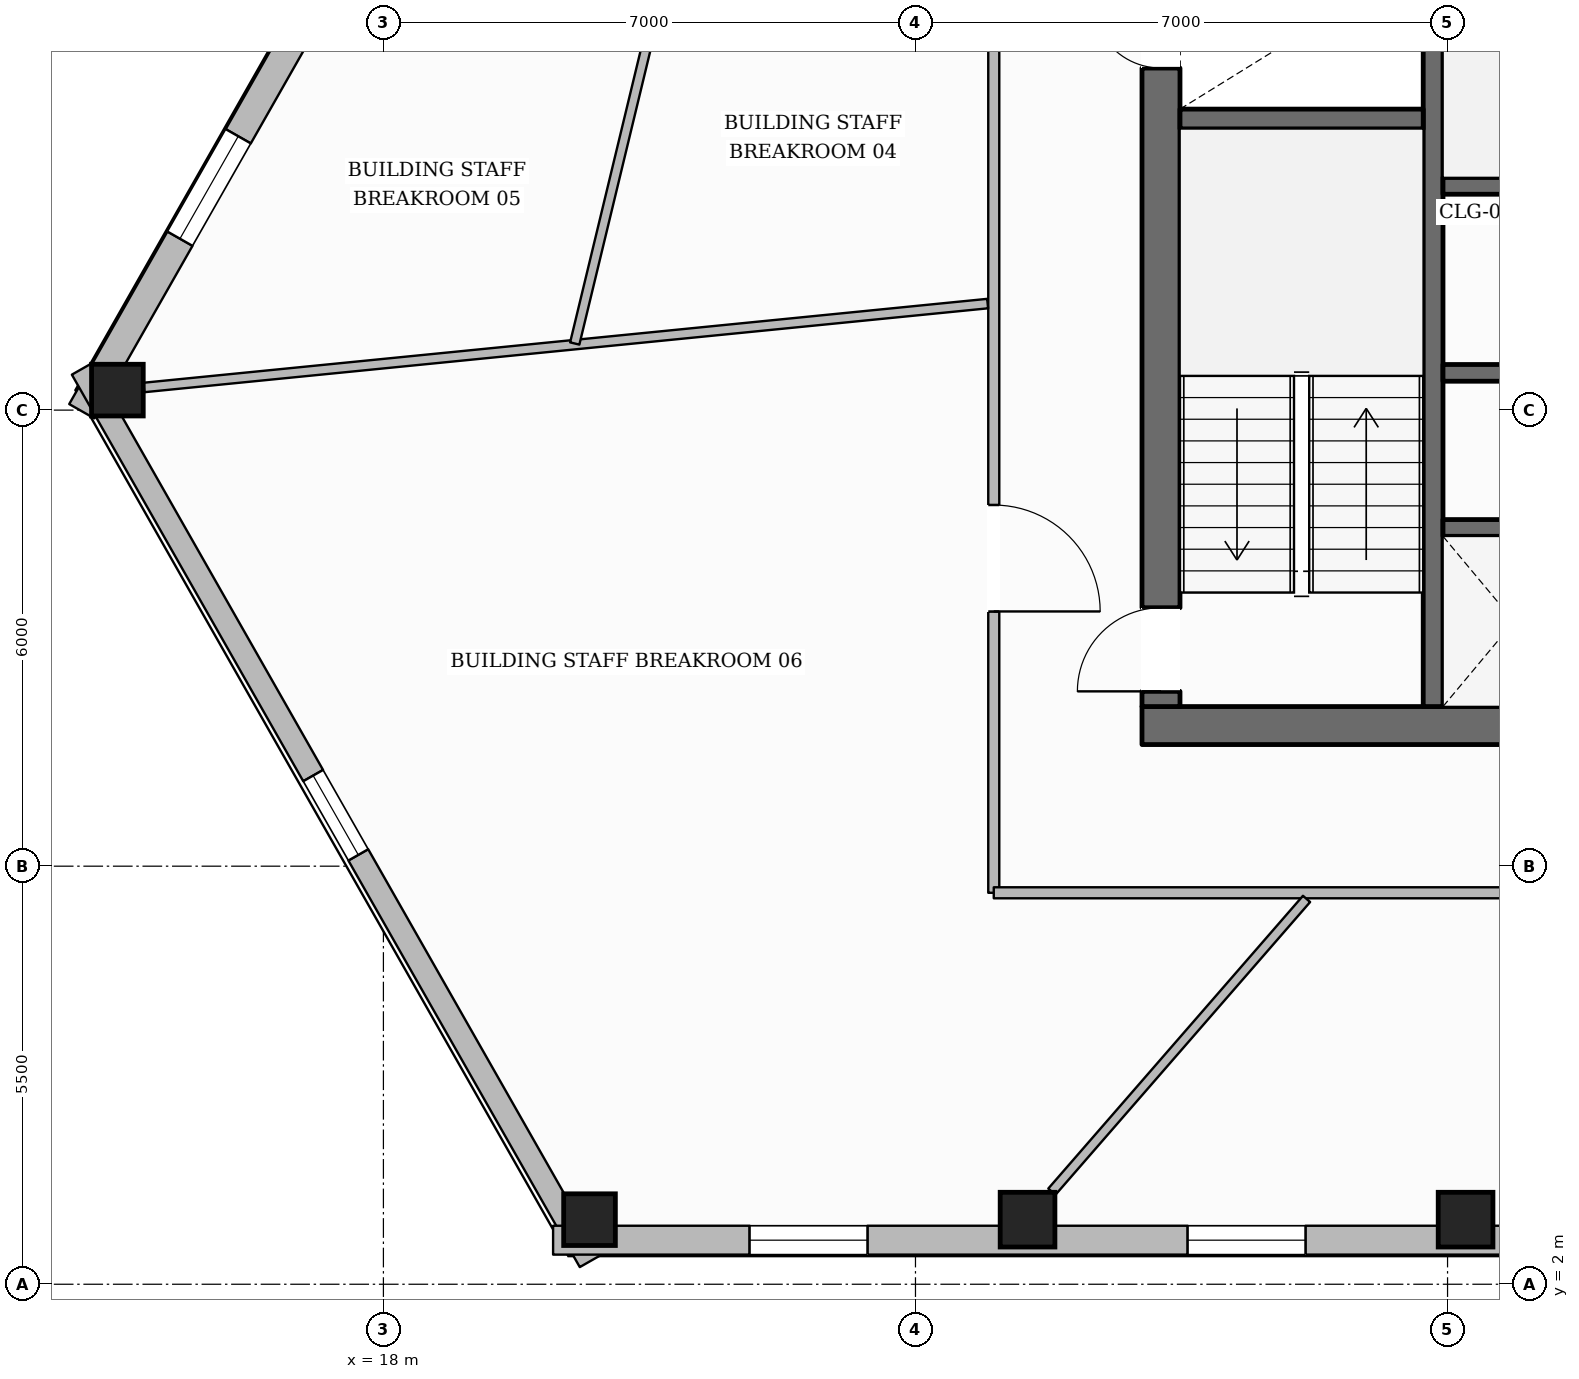
"""IFC4 building model, lengths in metres.
Left out: names, types, materials, properties, quantities, classifications, styles, units other than length and angle.
Written with IfcOpenShell. Run it as: python <this file> out.ifc"""

import sys

from ifc_helpers import new_model, si_unit, direction, frame, frame_2d, origin, origin_2d, place, context, subcontext, project, spatial, rectangle, hollow_rectangle, extrude, element, fill, save


model = new_model("IFC4")
c1 = context("Model", 3, precision=1e-05, world=origin(), true_north=direction((0.0, 1.0)))
c2 = subcontext(c1, "Body", "Model", "MODEL_VIEW")
j1 = project(units=[si_unit("LENGTHUNIT", "METRE"), si_unit("PLANEANGLEUNIT", "RADIAN")], contexts=[c1])
p1 = place(None, origin())
s1 = spatial("IfcSite", under=j1, at=p1, CompositionType="ELEMENT")
p2 = place(p1, origin())
s2 = spatial("IfcBuilding", under=s1, at=p2, CompositionType="ELEMENT")
p3 = place(p2, frame((0.0, 0.0, 93.2)))
s3 = spatial("IfcBuildingStorey", under=s2, at=p3, CompositionType="ELEMENT", Elevation=93.2)
p4 = place(p3, frame((27.98, 9.35, 0.0), z_axis=(0.0, 0.0, 1.0), x_axis=(1.0, 0.0, 0.0)))
e1 = element("IfcWall", 1, at=p4, inside=s3, PredefinedType="SOLIDWALL", context=c2, shape_type="SweptSolid", body=[
    extrude(rectangle(XDim=20.04, YDim=0.5, at=frame_2d((10.02, 0.0))), origin(), (0.0, 0.0, 1.0), 3.6),
])
p5 = place(p4, frame((10.52, 0.0, 0.0)))
e2 = element("IfcOpeningElement", 2, at=p5, cuts=e1, PredefinedType="OPENING", context=c2, shape_type="SweptSolid", body=[
    extrude(rectangle(XDim=1.4, YDim=2.2, at=frame_2d((0.7, 1.1))), frame((0.0, 0.26, 0.0), z_axis=(0.0, -1.0, 0.0), x_axis=(1.0, 0.0, 0.0)), (0.0, 0.0, 1.0), 0.52),
])
p6 = place(p3, frame((28.23, 9.6, 0.0), z_axis=(0.0, 0.0, 1.0), x_axis=(0.0, 1.0, 0.0)))
e3 = element("IfcWall", 3, at=p6, inside=s3, PredefinedType="SOLIDWALL", context=c2, shape_type="SweptSolid", body=[
    extrude(rectangle(XDim=13.0, YDim=0.5, at=frame_2d((6.5, 0.0))), origin(), (0.0, 0.0, 1.0), 3.6),
])
p7 = place(p6, frame((0.2, 0.0, 0.0)))
e4 = element("IfcOpeningElement", 4, at=p7, cuts=e3, PredefinedType="OPENING", context=c2, shape_type="SweptSolid", body=[
    extrude(rectangle(XDim=1.1, YDim=2.15, at=frame_2d((0.55, 1.075))), frame((0.0, 0.26, 0.0), z_axis=(0.0, -1.0, 0.0), x_axis=(1.0, 0.0, 0.0)), (0.0, 0.0, 1.0), 0.52),
])
p8 = place(p6, frame((8.4, 0.0, 0.0)))
e5 = element("IfcOpeningElement", 5, at=p8, cuts=e3, PredefinedType="OPENING", context=c2, shape_type="SweptSolid", body=[
    extrude(rectangle(XDim=0.9, YDim=2.1, at=frame_2d((0.45, 1.05))), frame((0.0, 0.26, 0.0), z_axis=(0.0, -1.0, 0.0), x_axis=(1.0, 0.0, 0.0)), (0.0, 0.0, 1.0), 0.52),
])
p9 = place(p3, frame((31.81, 9.6, 0.0), z_axis=(0.0, 0.0, 1.0), x_axis=(0.0, 1.0, 0.0)))
e6 = element("IfcWall", 6, at=p9, inside=s3, PredefinedType="SHEAR", context=c2, shape_type="SweptSolid", body=[
    extrude(rectangle(XDim=13.0, YDim=0.26, at=frame_2d((6.5, 0.0))), origin(), (0.0, 0.0, 1.0), 3.6),
])
p10 = place(p9, frame((10.925, 0.0, 0.0)))
e7 = element("IfcOpeningElement", 7, at=p10, cuts=e6, PredefinedType="OPENING", context=c2, shape_type="SweptSolid", body=[
    extrude(rectangle(XDim=1.25, YDim=2.25, at=frame_2d((0.625, 1.125))), frame((0.0, 0.14, 0.0), z_axis=(0.0, -1.0, 0.0), x_axis=(1.0, 0.0, 0.0)), (0.0, 0.0, 1.0), 0.28),
])
p11 = place(p3, frame((28.48, 17.33, 0.0), z_axis=(0.0, 0.0, 1.0), x_axis=(1.0, 0.0, 0.0)))
e8 = element("IfcWall", 8, at=p11, inside=s3, PredefinedType="SHEAR", context=c2, shape_type="SweptSolid", body=[
    extrude(rectangle(XDim=3.2, YDim=0.26, at=frame_2d((1.6, 0.0))), origin(), (0.0, 0.0, 1.0), 3.6),
])
p12 = place(p3, frame((31.94, 16.45, 0.0), z_axis=(0.0, 0.0, 1.0), x_axis=(1.0, 0.0, 0.0)))
e9 = element("IfcWall", 9, at=p12, inside=s3, PredefinedType="SOLIDWALL", context=c2, shape_type="SweptSolid", body=[
    extrude(rectangle(XDim=12.12, YDim=0.22, at=frame_2d((6.06, 0.0))), origin(), (0.0, 0.0, 1.0), 3.6),
])
p13 = place(p3, frame((31.94, 13.99, 0.0), z_axis=(0.0, 0.0, 1.0), x_axis=(1.0, 0.0, 0.0)))
e10 = element("IfcWall", 10, at=p13, inside=s3, PredefinedType="SOLIDWALL", context=c2, shape_type="SweptSolid", body=[
    extrude(rectangle(XDim=12.12, YDim=0.22, at=frame_2d((6.06, 0.0))), origin(), (0.0, 0.0, 1.0), 3.6),
])
p14 = place(p13, frame((1.21, 0.0, 0.0)))
e11 = element("IfcOpeningElement", 11, at=p14, cuts=e10, PredefinedType="OPENING", context=c2, shape_type="SweptSolid", body=[
    extrude(rectangle(XDim=0.9, YDim=2.1, at=frame_2d((0.45, 1.05))), frame((0.0, 0.12, 0.0), z_axis=(0.0, -1.0, 0.0), x_axis=(1.0, 0.0, 0.0)), (0.0, 0.0, 1.0), 0.24),
])
p15 = place(p13, frame((4.31, 0.0, 0.0)))
e12 = element("IfcOpeningElement", 12, at=p15, cuts=e10, PredefinedType="OPENING", context=c2, shape_type="SweptSolid", body=[
    extrude(rectangle(XDim=0.9, YDim=2.1, at=frame_2d((0.45, 1.05))), frame((0.0, 0.12, 0.0), z_axis=(0.0, -1.0, 0.0), x_axis=(1.0, 0.0, 0.0)), (0.0, 0.0, 1.0), 0.24),
])
p16 = place(p13, frame((6.535, 0.0, 0.0)))
e13 = element("IfcOpeningElement", 13, at=p16, cuts=e10, PredefinedType="OPENING", context=c2, shape_type="SweptSolid", body=[
    extrude(rectangle(XDim=1.1, YDim=2.2, at=frame_2d((0.55, 1.1))), frame((0.0, 0.12, 0.0), z_axis=(0.0, -1.0, 0.0), x_axis=(1.0, 0.0, 0.0)), (0.0, 0.0, 1.0), 0.24),
])
p17 = place(p13, frame((8.585, 0.0, 0.0)))
e14 = element("IfcOpeningElement", 14, at=p17, cuts=e10, PredefinedType="OPENING", context=c2, shape_type="SweptSolid", body=[
    extrude(rectangle(XDim=1.1, YDim=2.2, at=frame_2d((0.55, 1.1))), frame((0.0, 0.12, 0.0), z_axis=(0.0, -1.0, 0.0), x_axis=(1.0, 0.0, 0.0)), (0.0, 0.0, 1.0), 0.24),
])
p18 = place(p13, frame((10.635, 0.0, 0.0)))
e15 = element("IfcOpeningElement", 15, at=p18, cuts=e10, PredefinedType="OPENING", context=c2, shape_type="SweptSolid", body=[
    extrude(rectangle(XDim=1.1, YDim=2.2, at=frame_2d((0.55, 1.1))), frame((0.0, 0.12, 0.0), z_axis=(0.0, -1.0, 0.0), x_axis=(1.0, 0.0, 0.0)), (0.0, 0.0, 1.0), 0.24),
])
p19 = place(p3, frame((31.94, 11.95, 0.0), z_axis=(0.0, 0.0, 1.0), x_axis=(1.0, 0.0, 0.0)))
e16 = element("IfcWall", 16, at=p19, inside=s3, PredefinedType="SOLIDWALL", context=c2, shape_type="SweptSolid", body=[
    extrude(rectangle(XDim=6.19, YDim=0.22, at=frame_2d((3.095, 0.0))), origin(), (0.0, 0.0, 1.0), 3.6),
])
for number, where, z_axis, x_axis in (
    (17, (14.5, 13.763, 0.0), (0.0, 0.0, 1.0), (1.0, 0.0, 0.0)),
    (18, (20.712, 2.85, 0.0), (0.0, 0.0, 1.0), (1.0, 0.0, 0.0)),
):
    element("IfcColumn", number, at=place(p3, frame(where, z_axis=z_axis, x_axis=x_axis)), inside=s3, PredefinedType="COLUMN", context=c2, shape_type="SweptSolid", body=[
        extrude(hollow_rectangle(XDim=0.68, YDim=0.68, WallThickness=0.03, at=origin_2d()), origin(), (0.0, 0.0, 1.0), 3.6),
    ])
for number, where, z_axis, x_axis in (
    (19, (26.474, 2.85, 0.0), (0.0, 0.0, 1.0), (1.0, 0.0, 0.0)),
    (20, (32.237, 2.85, 0.0), (0.0, 0.0, 1.0), (1.0, 0.0, 0.0)),
):
    element("IfcColumn", number, at=place(p3, frame(where, z_axis=z_axis, x_axis=x_axis)), inside=s3, PredefinedType="COLUMN", context=c2, shape_type="SweptSolid", body=[
        extrude(hollow_rectangle(XDim=0.72, YDim=0.72, WallThickness=0.032, at=origin_2d()), origin(), (0.0, 0.0, 1.0), 3.6),
    ])
p20 = place(p3, frame((14.031, 13.485, 0.0), z_axis=(0.0, 0.0, 1.0), x_axis=(0.494642620698, 0.869096472084, 0.0)))
e21 = element("IfcWall", 21, at=p20, inside=s3, PredefinedType="STANDARD", context=c2, shape_type="SweptSolid", body=[
    extrude(rectangle(XDim=35.916, YDim=0.38, at=frame_2d((17.958, 0.0))), origin(), (0.0, 0.0, 1.0), 3.059),
])
p21 = place(p20, frame((31.748, 0.0, 0.65)))
e22 = element("IfcOpeningElement", 22, at=p21, cuts=e21, PredefinedType="OPENING", context=c2, shape_type="SweptSolid", body=[
    extrude(rectangle(XDim=1.55, YDim=1.75, at=frame_2d((0.775, 0.875))), frame((0.0, 0.2, 0.0), z_axis=(0.0, -1.0, 0.0), x_axis=(1.0, 0.0, 0.0)), (0.0, 0.0, 1.0), 0.4),
])
p22 = place(p20, frame((25.921, 0.0, 0.65)))
e23 = element("IfcOpeningElement", 23, at=p22, cuts=e21, PredefinedType="OPENING", context=c2, shape_type="SweptSolid", body=[
    extrude(rectangle(XDim=1.55, YDim=1.75, at=frame_2d((0.775, 0.875))), frame((0.0, 0.2, 0.0), z_axis=(0.0, -1.0, 0.0), x_axis=(1.0, 0.0, 0.0)), (0.0, 0.0, 1.0), 0.4),
])
p23 = place(p20, frame((8.439, 0.0, 0.65)))
e24 = element("IfcOpeningElement", 24, at=p23, cuts=e21, PredefinedType="OPENING", context=c2, shape_type="SweptSolid", body=[
    extrude(rectangle(XDim=1.55, YDim=1.75, at=frame_2d((0.775, 0.875))), frame((0.0, 0.2, 0.0), z_axis=(0.0, -1.0, 0.0), x_axis=(1.0, 0.0, 0.0)), (0.0, 0.0, 1.0), 0.4),
])
p24 = place(p20, frame((2.612, 0.0, 0.65)))
e25 = element("IfcOpeningElement", 25, at=p24, cuts=e21, PredefinedType="OPENING", context=c2, shape_type="SweptSolid", body=[
    extrude(rectangle(XDim=1.55, YDim=1.75, at=frame_2d((0.775, 0.875))), frame((0.0, 0.2, 0.0), z_axis=(0.0, -1.0, 0.0), x_axis=(1.0, 0.0, 0.0)), (0.0, 0.0, 1.0), 0.4),
])
p25 = place(p3, frame((20.714, 2.3, 0.0), z_axis=(0.0, 0.0, 1.0), x_axis=(-0.494645467688, 0.869094851726, 0.0)))
e26 = element("IfcWall", 26, at=p25, inside=s3, PredefinedType="STANDARD", context=c2, shape_type="SweptSolid", body=[
    extrude(rectangle(XDim=13.51, YDim=0.3, at=frame_2d((6.755, 0.0))), origin(), (0.0, 0.0, 1.0), 3.059),
])
p26 = place(p25, frame((6.155, 0.0, 0.65)))
e27 = element("IfcOpeningElement", 27, at=p26, cuts=e26, PredefinedType="OPENING", context=c2, shape_type="SweptSolid", body=[
    extrude(rectangle(XDim=1.2, YDim=1.7, at=frame_2d((0.6, 0.85))), frame((0.0, 0.16, 0.0), z_axis=(0.0, -1.0, 0.0), x_axis=(1.0, 0.0, 0.0)), (0.0, 0.0, 1.0), 0.32),
])
p27 = place(p3, frame((55.768, 2.58, 0.0), z_axis=(0.0, 0.0, 1.0), x_axis=(-1.0, 0.0, 0.0)))
e28 = element("IfcWall", 28, at=p27, inside=s3, PredefinedType="STANDARD", context=c2, shape_type="SweptSolid", body=[
    extrude(rectangle(XDim=35.535, YDim=0.38, at=frame_2d((17.768, 0.0))), origin(), (0.0, 0.0, 1.0), 3.059),
])
p28 = place(p27, frame((31.399, 0.0, 0.65)))
e29 = element("IfcOpeningElement", 29, at=p28, cuts=e28, PredefinedType="OPENING", context=c2, shape_type="SweptSolid", body=[
    extrude(rectangle(XDim=1.55, YDim=1.75, at=frame_2d((0.775, 0.875))), frame((0.0, 0.2, 0.0), z_axis=(0.0, -1.0, 0.0), x_axis=(1.0, 0.0, 0.0)), (0.0, 0.0, 1.0), 0.4),
])
p29 = place(p27, frame((25.637, 0.0, 0.65)))
e30 = element("IfcOpeningElement", 30, at=p29, cuts=e28, PredefinedType="OPENING", context=c2, shape_type="SweptSolid", body=[
    extrude(rectangle(XDim=1.55, YDim=1.75, at=frame_2d((0.775, 0.875))), frame((0.0, 0.2, 0.0), z_axis=(0.0, -1.0, 0.0), x_axis=(1.0, 0.0, 0.0)), (0.0, 0.0, 1.0), 0.4),
])
p30 = place(p27, frame((14.111, 0.0, 0.65)))
e31 = element("IfcOpeningElement", 31, at=p30, cuts=e28, PredefinedType="OPENING", context=c2, shape_type="SweptSolid", body=[
    extrude(rectangle(XDim=1.55, YDim=1.75, at=frame_2d((0.775, 0.875))), frame((0.0, 0.2, 0.0), z_axis=(0.0, -1.0, 0.0), x_axis=(1.0, 0.0, 0.0)), (0.0, 0.0, 1.0), 0.4),
])
p31 = place(p27, frame((8.348, 0.0, 0.65)))
e32 = element("IfcOpeningElement", 32, at=p31, cuts=e28, PredefinedType="OPENING", context=c2, shape_type="SweptSolid", body=[
    extrude(rectangle(XDim=1.55, YDim=1.75, at=frame_2d((0.775, 0.875))), frame((0.0, 0.2, 0.0), z_axis=(0.0, -1.0, 0.0), x_axis=(1.0, 0.0, 0.0)), (0.0, 0.0, 1.0), 0.4),
])
p32 = place(p27, frame((2.585, 0.0, 0.65)))
e33 = element("IfcOpeningElement", 33, at=p32, cuts=e28, PredefinedType="OPENING", context=c2, shape_type="SweptSolid", body=[
    extrude(rectangle(XDim=1.55, YDim=1.75, at=frame_2d((0.775, 0.875))), frame((0.0, 0.2, 0.0), z_axis=(0.0, -1.0, 0.0), x_axis=(1.0, 0.0, 0.0)), (0.0, 0.0, 1.0), 0.4),
])
p33 = place(p3, frame((26.03, 25.05, 0.0), z_axis=(0.0, 0.0, 1.0), x_axis=(0.0, -1.0, 0.0)))
e34 = element("IfcWall", 34, at=p33, inside=s3, PredefinedType="PARTITIONING", context=c2, shape_type="SweptSolid", body=[
    extrude(rectangle(XDim=17.9, YDim=0.145, at=frame_2d((8.95, 0.0))), origin(), (0.0, 0.0, 1.0), 3.288),
])
p34 = place(p33, frame((4.67, 0.0, 0.0)))
e35 = element("IfcOpeningElement", 35, at=p34, cuts=e34, PredefinedType="OPENING", context=c2, shape_type="SweptSolid", body=[
    extrude(rectangle(XDim=0.98, YDim=2.15, at=frame_2d((0.49, 1.075))), frame((0.0, 0.083, 0.0), z_axis=(0.0, -1.0, 0.0), x_axis=(1.0, 0.0, 0.0)), (0.0, 0.0, 1.0), 0.165),
])
p35 = place(p33, frame((12.799, 0.0, 0.0)))
e36 = element("IfcOpeningElement", 36, at=p35, cuts=e34, PredefinedType="OPENING", context=c2, shape_type="SweptSolid", body=[
    extrude(rectangle(XDim=1.4, YDim=2.2, at=frame_2d((0.7, 1.1))), frame((0.0, 0.083, 0.0), z_axis=(0.0, -1.0, 0.0), x_axis=(1.0, 0.0, 0.0)), (0.0, 0.0, 1.0), 0.165),
])
p36 = place(p3, frame((26.03, 7.15, 0.0), z_axis=(0.0, 0.0, 1.0), x_axis=(1.0, 0.0, 0.0)))
e37 = element("IfcWall", 37, at=p36, inside=s3, PredefinedType="PARTITIONING", context=c2, shape_type="SweptSolid", body=[
    extrude(rectangle(XDim=23.94, YDim=0.145, at=frame_2d((11.97, 0.0))), origin(), (0.0, 0.0, 1.0), 3.6),
])
p37 = place(p36, frame((11.27, 0.0, 0.0)))
e38 = element("IfcOpeningElement", 38, at=p37, cuts=e37, PredefinedType="OPENING", context=c2, shape_type="SweptSolid", body=[
    extrude(rectangle(XDim=1.4, YDim=2.2, at=frame_2d((0.7, 1.1))), frame((0.0, 0.083, 0.0), z_axis=(0.0, -1.0, 0.0), x_axis=(1.0, 0.0, 0.0)), (0.0, 0.0, 1.0), 0.165),
])
p38 = place(p3, frame((25.949, 14.902, 0.0), z_axis=(0.0, 0.0, 1.0), x_axis=(-0.995091212478, -0.0989620071, 0.0)))
e39 = element("IfcWall", 39, at=p38, inside=s3, PredefinedType="PARTITIONING", context=c2, shape_type="SweptSolid", body=[
    extrude(rectangle(XDim=11.156, YDim=0.125, at=frame_2d((5.578, 0.0))), origin(), (0.0, 0.0, 1.0), 3.141),
])
p39 = place(p3, frame((30.145, 7.07, 0.0), z_axis=(0.0, 0.0, 1.0), x_axis=(-0.656311309617, -0.75449020197, 0.0)))
e40 = element("IfcWall", 40, at=p39, inside=s3, PredefinedType="PARTITIONING", context=c2, shape_type="SweptSolid", body=[
    extrude(rectangle(XDim=5.105, YDim=0.125, at=frame_2d((2.553, 0.0))), origin(), (0.0, 0.0, 1.0), 3.6),
])
p40 = place(p3, frame((23.881, 28.301, 0.0), z_axis=(0.0, 0.0, 1.0), x_axis=(-0.234828781447, -0.972036750027, 0.0)))
e41 = element("IfcWall", 41, at=p40, inside=s3, PredefinedType="PARTITIONING", context=c2, shape_type="SweptSolid", body=[
    extrude(rectangle(XDim=14.325, YDim=0.125, at=frame_2d((7.163, 0.0))), origin(), (0.0, 0.0, 1.0), 3.288),
])
p41 = place(p40, frame((6.679, 0.0, 0.0)))
e42 = element("IfcOpeningElement", 42, at=p41, cuts=e41, PredefinedType="OPENING", context=c2, shape_type="SweptSolid", body=[
    extrude(rectangle(XDim=0.98, YDim=2.15, at=frame_2d((0.49, 1.075))), frame((0.0, 0.073, 0.0), z_axis=(0.0, -1.0, 0.0), x_axis=(1.0, 0.0, 0.0)), (0.0, 0.0, 1.0), 0.145),
])
p42 = place(p24, origin())
e43 = element("IfcWindow", 43, at=p42, inside=s3, PartitioningType="SINGLE_PANEL", PredefinedType="WINDOW", context=c2, shape_type="SweptSolid", body=[
    extrude(rectangle(XDim=1.55, YDim=1.75, at=frame_2d((0.775, 0.875))), frame((0.0, 0.03, 0.0), z_axis=(0.0, -1.0, 0.0), x_axis=(1.0, 0.0, 0.0)), (0.0, 0.0, 1.0), 0.06),
])
fill(e25, e43)
p43 = place(p28, origin())
e44 = element("IfcWindow", 44, at=p43, inside=s3, PartitioningType="SINGLE_PANEL", PredefinedType="WINDOW", context=c2, shape_type="SweptSolid", body=[
    extrude(rectangle(XDim=1.55, YDim=1.75, at=frame_2d((0.775, 0.875))), frame((0.0, 0.03, 0.0), z_axis=(0.0, -1.0, 0.0), x_axis=(1.0, 0.0, 0.0)), (0.0, 0.0, 1.0), 0.06),
])
fill(e29, e44)
p44 = place(p29, origin())
e45 = element("IfcWindow", 45, at=p44, inside=s3, PartitioningType="SINGLE_PANEL", PredefinedType="WINDOW", context=c2, shape_type="SweptSolid", body=[
    extrude(rectangle(XDim=1.55, YDim=1.75, at=frame_2d((0.775, 0.875))), frame((0.0, 0.03, 0.0), z_axis=(0.0, -1.0, 0.0), x_axis=(1.0, 0.0, 0.0)), (0.0, 0.0, 1.0), 0.06),
])
fill(e30, e45)
p45 = place(p26, origin())
e46 = element("IfcWindow", 46, at=p45, inside=s3, PartitioningType="SINGLE_PANEL", PredefinedType="WINDOW", context=c2, shape_type="SweptSolid", body=[
    extrude(rectangle(XDim=1.2, YDim=1.7, at=frame_2d((0.6, 0.85))), frame((0.0, 0.03, 0.0), z_axis=(0.0, -1.0, 0.0), x_axis=(1.0, 0.0, 0.0)), (0.0, 0.0, 1.0), 0.06),
])
fill(e27, e46)
p46 = place(p7, origin())
e47 = element("IfcDoor", 47, at=p46, inside=s3, OperationType="SINGLE_SWING_LEFT", PredefinedType="DOOR", context=c2, shape_type="SweptSolid", body=[
    extrude(rectangle(XDim=1.1, YDim=2.15, at=frame_2d((0.55, 1.075))), frame((0.0, 0.025, 0.0), z_axis=(0.0, -1.0, 0.0), x_axis=(1.0, 0.0, 0.0)), (0.0, 0.0, 1.0), 0.05),
])
fill(e4, e47)
p47 = place(p8, origin())
e48 = element("IfcDoor", 48, at=p47, inside=s3, OperationType="SINGLE_SWING_RIGHT", PredefinedType="DOOR", context=c2, shape_type="SweptSolid", body=[
    extrude(rectangle(XDim=0.9, YDim=2.1, at=frame_2d((0.45, 1.05))), frame((0.0, 0.025, 0.0), z_axis=(0.0, -1.0, 0.0), x_axis=(1.0, 0.0, 0.0)), (0.0, 0.0, 1.0), 0.05),
])
fill(e5, e48)
p48 = place(p35, origin())
e49 = element("IfcDoor", 49, at=p48, inside=s3, OperationType="SINGLE_SWING_RIGHT", PredefinedType="DOOR", context=c2, shape_type="SweptSolid", body=[
    extrude(rectangle(XDim=1.4, YDim=2.2, at=frame_2d((0.7, 1.1))), frame((0.0, 0.025, 0.0), z_axis=(0.0, -1.0, 0.0), x_axis=(1.0, 0.0, 0.0)), (0.0, 0.0, 1.0), 0.05),
])
fill(e36, e49)
save(model, sys.argv[1])
